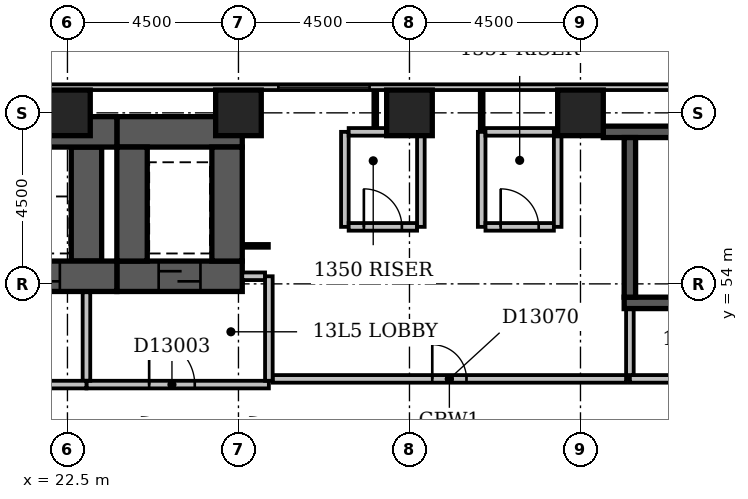
"""IFC4 building model, lengths in metres.
Left out: names, types, materials, properties, quantities, classifications, styles, units other than length and angle.
Written with IfcOpenShell. Run it as: python <this file> out.ifc"""

import sys

from ifc_helpers import new_model, si_unit, direction, frame, frame_2d, origin, origin_2d, place, context, subcontext, project, spatial, rectangle, extrude, element, fill, save


model = new_model("IFC4")
c1 = context("Model", 3, precision=1e-05, world=origin(), true_north=direction((0.0, 1.0)))
c2 = subcontext(c1, "Body", "Model", "MODEL_VIEW")
j1 = project(units=[si_unit("LENGTHUNIT", "METRE"), si_unit("PLANEANGLEUNIT", "RADIAN")], contexts=[c1])
p1 = place(None, origin())
s1 = spatial("IfcSite", under=j1, at=p1, CompositionType="ELEMENT")
p2 = place(p1, origin())
s2 = spatial("IfcBuilding", under=s1, at=p2, CompositionType="ELEMENT")
p3 = place(p2, frame((0.0, 0.0, 57.8)))
s3 = spatial("IfcBuildingStorey", under=s2, at=p3, CompositionType="ELEMENT", Elevation=57.8)
p4 = place(p3, frame((7.35, 54.2, -0.3), z_axis=(0.0, 0.0, 1.0), x_axis=(1.0, 0.0, 0.0)))
e1 = element("IfcWall", 1, at=p4, inside=s3, PredefinedType="SHEAR", context=c2, shape_type="SweptSolid", body=[
    extrude(rectangle(XDim=16.45, YDim=0.8, at=frame_2d((8.225, 0.0))), origin(), (0.0, 0.0, 1.0), 3.6),
])
p5 = place(p4, frame((1.35, 0.0, 0.3)))
e2 = element("IfcOpeningElement", 2, at=p5, cuts=e1, PredefinedType="OPENING", context=c2, shape_type="SweptSolid", body=[
    extrude(rectangle(XDim=1.1, YDim=2.1, at=frame_2d((0.55, 1.05))), frame((0.0, 0.412, 0.0), z_axis=(0.0, -1.0, 0.0), x_axis=(1.0, 0.0, 0.0)), (0.0, 0.0, 1.0), 0.824),
])
p6 = place(p4, frame((3.85, 0.0, 0.3)))
e3 = element("IfcOpeningElement", 3, at=p6, cuts=e1, PredefinedType="OPENING", context=c2, shape_type="SweptSolid", body=[
    extrude(rectangle(XDim=1.1, YDim=2.1, at=frame_2d((0.55, 1.05))), frame((0.0, 0.412, 0.0), z_axis=(0.0, -1.0, 0.0), x_axis=(1.0, 0.0, 0.0)), (0.0, 0.0, 1.0), 0.824),
])
p7 = place(p4, frame((6.35, 0.0, 0.3)))
e4 = element("IfcOpeningElement", 4, at=p7, cuts=e1, PredefinedType="OPENING", context=c2, shape_type="SweptSolid", body=[
    extrude(rectangle(XDim=1.1, YDim=2.1, at=frame_2d((0.55, 1.05))), frame((0.0, 0.412, 0.0), z_axis=(0.0, -1.0, 0.0), x_axis=(1.0, 0.0, 0.0)), (0.0, 0.0, 1.0), 0.824),
])
p8 = place(p4, frame((8.85, 0.0, 0.3)))
e5 = element("IfcOpeningElement", 5, at=p8, cuts=e1, PredefinedType="OPENING", context=c2, shape_type="SweptSolid", body=[
    extrude(rectangle(XDim=1.1, YDim=2.1, at=frame_2d((0.55, 1.05))), frame((0.0, 0.412, 0.0), z_axis=(0.0, -1.0, 0.0), x_axis=(1.0, 0.0, 0.0)), (0.0, 0.0, 1.0), 0.824),
])
p9 = place(p4, frame((11.35, 0.0, 0.3)))
e6 = element("IfcOpeningElement", 6, at=p9, cuts=e1, PredefinedType="OPENING", context=c2, shape_type="SweptSolid", body=[
    extrude(rectangle(XDim=1.1, YDim=2.1, at=frame_2d((0.55, 1.05))), frame((0.0, 0.412, 0.0), z_axis=(0.0, -1.0, 0.0), x_axis=(1.0, 0.0, 0.0)), (0.0, 0.0, 1.0), 0.824),
])
p10 = place(p4, frame((13.85, 0.0, 0.3)))
e7 = element("IfcOpeningElement", 7, at=p10, cuts=e1, PredefinedType="OPENING", context=c2, shape_type="SweptSolid", body=[
    extrude(rectangle(XDim=1.1, YDim=2.1, at=frame_2d((0.55, 1.05))), frame((0.0, 0.412, 0.0), z_axis=(0.0, -1.0, 0.0), x_axis=(1.0, 0.0, 0.0)), (0.0, 0.0, 1.0), 0.824),
])
p11 = place(p3, frame((7.35, 58.0, -0.3), z_axis=(0.0, 0.0, 1.0), x_axis=(1.0, 0.0, 0.0)))
e8 = element("IfcWall", 8, at=p11, inside=s3, PredefinedType="SHEAR", context=c2, shape_type="SweptSolid", body=[
    extrude(rectangle(XDim=16.45, YDim=0.8, at=frame_2d((8.225, 0.0))), origin(), (0.0, 0.0, 1.0), 3.6),
])
p12 = place(p3, frame((23.0, 54.6, -0.3), z_axis=(0.0, 0.0, 1.0), x_axis=(0.0, 1.0, 0.0)))
e9 = element("IfcWall", 9, at=p12, inside=s3, PredefinedType="SHEAR", context=c2, shape_type="SweptSolid", body=[
    extrude(rectangle(XDim=3.0, YDim=0.8, at=frame_2d((1.5, 0.0))), origin(), (0.0, 0.0, 1.0), 3.6),
])
p13 = place(p3, frame((23.8, 54.2, -0.3), z_axis=(0.0, 0.0, 1.0), x_axis=(1.0, 0.0, 0.0)))
e10 = element("IfcWall", 10, at=p13, inside=s3, PredefinedType="SHEAR", context=c2, shape_type="SweptSolid", body=[
    extrude(rectangle(XDim=3.3, YDim=0.8, at=frame_2d((1.65, 0.0))), origin(), (0.0, 0.0, 1.0), 3.6),
])
p14 = place(p13, frame((1.1, 0.0, 0.3)))
e11 = element("IfcOpeningElement", 11, at=p14, cuts=e10, PredefinedType="OPENING", context=c2, shape_type="SweptSolid", body=[
    extrude(rectangle(XDim=1.1, YDim=2.1, at=frame_2d((0.55, 1.05))), frame((0.0, 0.412, 0.0), z_axis=(0.0, -1.0, 0.0), x_axis=(1.0, 0.0, 0.0)), (0.0, 0.0, 1.0), 0.824),
])
p15 = place(p3, frame((23.8, 58.0, -0.3), z_axis=(0.0, 0.0, 1.0), x_axis=(1.0, 0.0, 0.0)))
e12 = element("IfcWall", 12, at=p15, inside=s3, PredefinedType="SHEAR", context=c2, shape_type="SweptSolid", body=[
    extrude(rectangle(XDim=3.3, YDim=0.8, at=frame_2d((1.65, 0.0))), origin(), (0.0, 0.0, 1.0), 3.6),
])
for number, where, z_axis, x_axis in (
    (13, (24.2, 54.6, -0.3), (0.0, 0.0, 1.0), (0.0, 1.0, 0.0)),
    (14, (26.7, 54.6, -0.3), (0.0, 0.0, 1.0), (0.0, 1.0, 0.0)),
):
    element("IfcWall", number, at=place(p3, frame(where, z_axis=z_axis, x_axis=x_axis)), inside=s3, PredefinedType="SHEAR", context=c2, shape_type="SweptSolid", body=[
        extrude(rectangle(XDim=3.0, YDim=0.8, at=frame_2d((1.5, 0.0))), origin(), (0.0, 0.0, 1.0), 3.6),
    ])
p16 = place(p3, frame((36.6, 58.0, -0.3), z_axis=(0.0, 0.0, 1.0), x_axis=(1.0, 0.0, 0.0)))
e15 = element("IfcWall", 15, at=p16, inside=s3, PredefinedType="SHEAR", context=c2, shape_type="SweptSolid", body=[
    extrude(rectangle(XDim=7.8, YDim=0.3, at=frame_2d((3.9, 0.0))), origin(), (0.0, 0.0, 1.0), 3.6),
])
p17 = place(p3, frame((37.15, 53.5, -0.3), z_axis=(0.0, 0.0, 1.0), x_axis=(1.0, 0.0, 0.0)))
e16 = element("IfcWall", 16, at=p17, inside=s3, PredefinedType="SHEAR", context=c2, shape_type="SweptSolid", body=[
    extrude(rectangle(XDim=7.0, YDim=0.3, at=frame_2d((3.5, 0.0))), origin(), (0.0, 0.0, 1.0), 3.6),
])
p18 = place(p17, frame((5.58, 0.0, 0.3)))
e17 = element("IfcOpeningElement", 17, at=p18, cuts=e16, PredefinedType="OPENING", context=c2, shape_type="SweptSolid", body=[
    extrude(rectangle(XDim=1.1, YDim=2.1, at=frame_2d((0.55, 1.05))), frame((0.0, 0.162, 0.0), z_axis=(0.0, -1.0, 0.0), x_axis=(1.0, 0.0, 0.0)), (0.0, 0.0, 1.0), 0.324),
])
p19 = place(p3, frame((37.3, 53.65, -0.3), z_axis=(0.0, 0.0, 1.0), x_axis=(0.0, 1.0, 0.0)))
e18 = element("IfcWall", 18, at=p19, inside=s3, PredefinedType="SHEAR", context=c2, shape_type="SweptSolid", body=[
    extrude(rectangle(XDim=4.2, YDim=0.3, at=frame_2d((2.1, 0.0))), origin(), (0.0, 0.0, 1.0), 3.6),
])
for number, where, z_axis, x_axis in (
    (19, (22.5, 58.5, -0.3), (0.0, 0.0, 1.0), (1.0, 0.0, 0.0)),
    (20, (27.0, 58.5, -0.3), (0.0, 0.0, 1.0), (1.0, 0.0, 0.0)),
    (21, (31.5, 58.5, -0.3), (0.0, 0.0, 1.0), (1.0, 0.0, 0.0)),
    (22, (36.0, 58.5, -0.3), (0.0, 0.0, 1.0), (1.0, 0.0, 0.0)),
):
    element("IfcColumn", number, at=place(p3, frame(where, z_axis=z_axis, x_axis=x_axis)), inside=s3, PredefinedType="COLUMN", context=c2, shape_type="SweptSolid", body=[
        extrude(rectangle(XDim=1.2, YDim=1.2, at=origin_2d()), origin(), (0.0, 0.0, 1.0), 3.6),
    ])
p20 = place(p3, frame((68.1, 59.175, 0.0), z_axis=(0.0, 0.0, 1.0), x_axis=(-1.0, 0.0, 0.0)))
e23 = element("IfcWall", 23, at=p20, inside=s3, PredefinedType="STANDARD", context=c2, shape_type="SweptSolid", body=[
    extrude(rectangle(XDim=68.85, YDim=0.15, at=frame_2d((34.425, 0.0))), origin(), (0.0, 0.0, 1.0), 2.7),
])
p21 = place(p20, frame((37.65, 0.0, 0.6)))
e24 = element("IfcOpeningElement", 24, at=p21, cuts=e23, PredefinedType="OPENING", context=c2, shape_type="SweptSolid", body=[
    extrude(rectangle(XDim=2.4, YDim=1.8, at=frame_2d((1.2, 0.9))), frame((0.0, 0.087, 0.0), z_axis=(0.0, -1.0, 0.0), x_axis=(1.0, 0.0, 0.0)), (0.0, 0.0, 1.0), 0.174),
])
p22 = place(p3, frame((8.0, 51.35, 0.0), z_axis=(0.0, 0.0, 1.0), x_axis=(1.0, 0.0, 0.0)))
e25 = element("IfcWall", 25, at=p22, inside=s3, PredefinedType="PARTITIONING", context=c2, shape_type="SweptSolid", body=[
    extrude(rectangle(XDim=15.0, YDim=0.2, at=frame_2d((7.5, 0.0))), origin(), (0.0, 0.0, 1.0), 3.3),
])
p23 = place(p22, frame((3.4, 0.0, 0.0)))
e26 = element("IfcOpeningElement", 26, at=p23, cuts=e25, PredefinedType="OPENING", context=c2, shape_type="SweptSolid", body=[
    extrude(rectangle(XDim=1.2, YDim=2.1, at=frame_2d((0.6, 1.05))), frame((0.0, 0.112, 0.0), z_axis=(0.0, -1.0, 0.0), x_axis=(1.0, 0.0, 0.0)), (0.0, 0.0, 1.0), 0.224),
])
p24 = place(p22, frame((9.4, 0.0, 0.0)))
e27 = element("IfcOpeningElement", 27, at=p24, cuts=e25, PredefinedType="OPENING", context=c2, shape_type="SweptSolid", body=[
    extrude(rectangle(XDim=1.2, YDim=2.1, at=frame_2d((0.6, 1.05))), frame((0.0, 0.112, 0.0), z_axis=(0.0, -1.0, 0.0), x_axis=(1.0, 0.0, 0.0)), (0.0, 0.0, 1.0), 0.224),
])
p25 = place(p3, frame((23.0, 51.45, 0.0), z_axis=(0.0, 0.0, 1.0), x_axis=(0.0, 1.0, 0.0)))
e28 = element("IfcWall", 28, at=p25, inside=s3, PredefinedType="PARTITIONING", context=c2, shape_type="SweptSolid", body=[
    extrude(rectangle(XDim=2.33, YDim=0.2, at=frame_2d((1.165, 0.0))), origin(), (0.0, 0.0, 1.0), 3.3),
])
p26 = place(p3, frame((23.0, 51.35, 0.0), z_axis=(0.0, 0.0, 1.0), x_axis=(1.0, 0.0, 0.0)))
e29 = element("IfcWall", 29, at=p26, inside=s3, PredefinedType="PARTITIONING", context=c2, shape_type="SweptSolid", body=[
    extrude(rectangle(XDim=4.8, YDim=0.2, at=frame_2d((2.4, 0.0))), origin(), (0.0, 0.0, 1.0), 3.3),
])
p27 = place(p26, frame((1.65, 0.0, 0.0)))
e30 = element("IfcOpeningElement", 30, at=p27, cuts=e29, PredefinedType="OPENING", context=c2, shape_type="SweptSolid", body=[
    extrude(rectangle(XDim=1.2, YDim=2.1, at=frame_2d((0.6, 1.05))), frame((0.0, 0.112, 0.0), z_axis=(0.0, -1.0, 0.0), x_axis=(1.0, 0.0, 0.0)), (0.0, 0.0, 1.0), 0.224),
])
p28 = place(p3, frame((27.8, 51.45, 0.0), z_axis=(0.0, 0.0, 1.0), x_axis=(0.0, 1.0, 0.0)))
e31 = element("IfcWall", 31, at=p28, inside=s3, PredefinedType="PARTITIONING", context=c2, shape_type="SweptSolid", body=[
    extrude(rectangle(XDim=2.75, YDim=0.2, at=frame_2d((1.375, 0.0))), origin(), (0.0, 0.0, 1.0), 3.3),
])
p29 = place(p3, frame((27.1, 54.2, 0.0), z_axis=(0.0, 0.0, 1.0), x_axis=(1.0, 0.0, 0.0)))
e32 = element("IfcWall", 32, at=p29, inside=s3, PredefinedType="PARTITIONING", context=c2, shape_type="SweptSolid", body=[
    extrude(rectangle(XDim=0.6, YDim=0.2, at=frame_2d((0.3, 0.0))), origin(), (0.0, 0.0, 1.0), 3.3),
])
p30 = place(p3, frame((37.3, 51.5, 0.0), z_axis=(0.0, 0.0, 1.0), x_axis=(1.0, 0.0, 0.0)))
e33 = element("IfcWall", 33, at=p30, inside=s3, PredefinedType="PARTITIONING", context=c2, shape_type="SweptSolid", body=[
    extrude(rectangle(XDim=6.7, YDim=0.2, at=frame_2d((3.35, 0.0))), origin(), (0.0, 0.0, 1.0), 3.3),
])
p31 = place(p30, frame((2.75, 0.0, 0.0)))
e34 = element("IfcOpeningElement", 34, at=p31, cuts=e33, PredefinedType="OPENING", context=c2, shape_type="SweptSolid", body=[
    extrude(rectangle(XDim=1.2, YDim=2.1, at=frame_2d((0.6, 1.05))), frame((0.0, 0.112, 0.0), z_axis=(0.0, -1.0, 0.0), x_axis=(1.0, 0.0, 0.0)), (0.0, 0.0, 1.0), 0.224),
])
p32 = place(p3, frame((37.3, 51.6, 0.0), z_axis=(0.0, 0.0, 1.0), x_axis=(0.0, 1.0, 0.0)))
e35 = element("IfcWall", 35, at=p32, inside=s3, PredefinedType="PARTITIONING", context=c2, shape_type="SweptSolid", body=[
    extrude(rectangle(XDim=1.73, YDim=0.2, at=frame_2d((0.865, 0.0))), origin(), (0.0, 0.0, 1.0), 3.3),
])
p33 = place(p3, frame((27.9, 51.5, 0.0), z_axis=(0.0, 0.0, 1.0), x_axis=(1.0, 0.0, 0.0)))
e36 = element("IfcWall", 36, at=p33, inside=s3, PredefinedType="PARTITIONING", context=c2, shape_type="SweptSolid", body=[
    extrude(rectangle(XDim=9.3, YDim=0.2, at=frame_2d((4.65, 0.0))), origin(), (0.0, 0.0, 1.0), 3.3),
])
p34 = place(p33, frame((4.2, 0.0, 0.0)))
e37 = element("IfcOpeningElement", 37, at=p34, cuts=e36, PredefinedType="OPENING", context=c2, shape_type="SweptSolid", body=[
    extrude(rectangle(XDim=0.9, YDim=2.1, at=frame_2d((0.45, 1.05))), frame((0.0, 0.112, 0.0), z_axis=(0.0, -1.0, 0.0), x_axis=(1.0, 0.0, 0.0)), (0.0, 0.0, 1.0), 0.224),
])
p35 = place(p3, frame((27.1, 55.0, 0.0), z_axis=(0.0, 0.0, 1.0), x_axis=(1.0, 0.0, 0.0)))
e38 = element("IfcWall", 38, at=p35, inside=s3, PredefinedType="PARTITIONING", context=c2, shape_type="SweptSolid", body=[
    extrude(rectangle(XDim=0.7, YDim=0.1, at=frame_2d((0.35, 0.0))), origin(), (0.0, 0.0, 1.0), 3.3),
])
p36 = place(p3, frame((29.8, 55.5, 0.0), z_axis=(0.0, 0.0, 1.0), x_axis=(0.0, 1.0, 0.0)))
e39 = element("IfcWall", 39, at=p36, inside=s3, PredefinedType="PARTITIONING", context=c2, shape_type="SweptSolid", body=[
    extrude(rectangle(XDim=2.5, YDim=0.2, at=frame_2d((1.25, 0.0))), origin(), (0.0, 0.0, 1.0), 3.3),
])
p37 = place(p3, frame((29.9, 55.5, 0.0), z_axis=(0.0, 0.0, 1.0), x_axis=(1.0, 0.0, 0.0)))
e40 = element("IfcWall", 40, at=p37, inside=s3, PredefinedType="PARTITIONING", context=c2, shape_type="SweptSolid", body=[
    extrude(rectangle(XDim=1.8, YDim=0.2, at=frame_2d((0.9, 0.0))), origin(), (0.0, 0.0, 1.0), 3.3),
])
p38 = place(p37, frame((0.4, 0.0, 0.0)))
e41 = element("IfcOpeningElement", 41, at=p38, cuts=e40, PredefinedType="OPENING", context=c2, shape_type="SweptSolid", body=[
    extrude(rectangle(XDim=1.0, YDim=2.1, at=frame_2d((0.5, 1.05))), frame((0.0, 0.112, 0.0), z_axis=(0.0, -1.0, 0.0), x_axis=(1.0, 0.0, 0.0)), (0.0, 0.0, 1.0), 0.224),
])
for number, where, z_axis, x_axis in (
    (42, (31.8, 55.5, 0.0), (0.0, 0.0, 1.0), (0.0, 1.0, 0.0)),
    (43, (33.4, 55.5, 0.0), (0.0, 0.0, 1.0), (0.0, 1.0, 0.0)),
):
    element("IfcWall", number, at=place(p3, frame(where, z_axis=z_axis, x_axis=x_axis)), inside=s3, PredefinedType="PARTITIONING", context=c2, shape_type="SweptSolid", body=[
        extrude(rectangle(XDim=2.5, YDim=0.2, at=frame_2d((1.25, 0.0))), origin(), (0.0, 0.0, 1.0), 3.3),
    ])
p39 = place(p3, frame((33.5, 55.5, 0.0), z_axis=(0.0, 0.0, 1.0), x_axis=(1.0, 0.0, 0.0)))
e44 = element("IfcWall", 44, at=p39, inside=s3, PredefinedType="PARTITIONING", context=c2, shape_type="SweptSolid", body=[
    extrude(rectangle(XDim=1.8, YDim=0.2, at=frame_2d((0.9, 0.0))), origin(), (0.0, 0.0, 1.0), 3.3),
])
p40 = place(p39, frame((0.4, 0.0, 0.0)))
e45 = element("IfcOpeningElement", 45, at=p40, cuts=e44, PredefinedType="OPENING", context=c2, shape_type="SweptSolid", body=[
    extrude(rectangle(XDim=1.0, YDim=2.1, at=frame_2d((0.5, 1.05))), frame((0.0, 0.112, 0.0), z_axis=(0.0, -1.0, 0.0), x_axis=(1.0, 0.0, 0.0)), (0.0, 0.0, 1.0), 0.224),
])
p41 = place(p3, frame((35.4, 55.5, 0.0), z_axis=(0.0, 0.0, 1.0), x_axis=(0.0, 1.0, 0.0)))
e46 = element("IfcWall", 46, at=p41, inside=s3, PredefinedType="PARTITIONING", context=c2, shape_type="SweptSolid", body=[
    extrude(rectangle(XDim=2.5, YDim=0.2, at=frame_2d((1.25, 0.0))), origin(), (0.0, 0.0, 1.0), 2.4),
])
p42 = place(p3, frame((29.9, 58.0, 0.0), z_axis=(0.0, 0.0, 1.0), x_axis=(1.0, 0.0, 0.0)))
e47 = element("IfcWall", 47, at=p42, inside=s3, PredefinedType="PARTITIONING", context=c2, shape_type="SweptSolid", body=[
    extrude(rectangle(XDim=1.8, YDim=0.2, at=frame_2d((0.9, 0.0))), origin(), (0.0, 0.0, 1.0), 3.3),
])
p43 = place(p3, frame((33.4, 58.0, 0.0), z_axis=(0.0, 0.0, 1.0), x_axis=(0.0, 1.0, 0.0)))
e48 = element("IfcWall", 48, at=p43, inside=s3, PredefinedType="PARTITIONING", context=c2, shape_type="SweptSolid", body=[
    extrude(rectangle(XDim=1.1, YDim=0.1, at=frame_2d((0.55, 0.0))), origin(), (0.0, 0.0, 1.0), 3.3),
])
p44 = place(p3, frame((33.5, 58.0, 0.0), z_axis=(0.0, 0.0, 1.0), x_axis=(1.0, 0.0, 0.0)))
e49 = element("IfcWall", 49, at=p44, inside=s3, PredefinedType="PARTITIONING", context=c2, shape_type="SweptSolid", body=[
    extrude(rectangle(XDim=1.8, YDim=0.2, at=frame_2d((0.9, 0.0))), origin(), (0.0, 0.0, 1.0), 3.3),
])
p45 = place(p3, frame((30.6, 58.1, 0.0), z_axis=(0.0, 0.0, 1.0), x_axis=(0.0, 1.0, 0.0)))
e50 = element("IfcWall", 50, at=p45, inside=s3, PredefinedType="PARTITIONING", context=c2, shape_type="SweptSolid", body=[
    extrude(rectangle(XDim=1.0, YDim=0.1, at=frame_2d((0.5, 0.0))), origin(), (0.0, 0.0, 1.0), 3.3),
])
p46 = place(p21, origin())
e51 = element("IfcWindow", 51, at=p46, inside=s3, PartitioningType="SINGLE_PANEL", PredefinedType="WINDOW", context=c2, shape_type="SweptSolid", body=[
    extrude(rectangle(XDim=2.4, YDim=1.8, at=frame_2d((1.2, 0.9))), frame((0.0, 0.03, 0.0), z_axis=(0.0, -1.0, 0.0), x_axis=(1.0, 0.0, 0.0)), (0.0, 0.0, 1.0), 0.06),
])
fill(e24, e51)
p47 = place(p27, origin())
e52 = element("IfcDoor", 52, at=p47, inside=s3, OperationType="SINGLE_SWING_LEFT", PredefinedType="DOOR", context=c2, shape_type="SweptSolid", body=[
    extrude(rectangle(XDim=1.2, YDim=2.1, at=frame_2d((0.6, 1.05))), frame((0.0, 0.025, 0.0), z_axis=(0.0, -1.0, 0.0), x_axis=(1.0, 0.0, 0.0)), (0.0, 0.0, 1.0), 0.05),
])
fill(e30, e52)
p48 = place(p14, origin())
e53 = element("IfcDoor", 53, at=p48, inside=s3, OperationType="SLIDING_TO_LEFT", PredefinedType="DOOR", context=c2, shape_type="SweptSolid", body=[
    extrude(rectangle(XDim=1.1, YDim=2.1, at=frame_2d((0.55, 1.05))), frame((0.0, 0.025, 0.0), z_axis=(0.0, -1.0, 0.0), x_axis=(1.0, 0.0, 0.0)), (0.0, 0.0, 1.0), 0.05),
])
fill(e11, e53)
p49 = place(p10, origin())
e54 = element("IfcDoor", 54, at=p49, inside=s3, OperationType="SLIDING_TO_LEFT", PredefinedType="DOOR", context=c2, shape_type="SweptSolid", body=[
    extrude(rectangle(XDim=1.1, YDim=2.1, at=frame_2d((0.55, 1.05))), frame((0.0, 0.025, 0.0), z_axis=(0.0, -1.0, 0.0), x_axis=(1.0, 0.0, 0.0)), (0.0, 0.0, 1.0), 0.05),
])
fill(e7, e54)
p50 = place(p34, origin())
e55 = element("IfcDoor", 55, at=p50, inside=s3, OperationType="SINGLE_SWING_LEFT", PredefinedType="DOOR", context=c2, shape_type="SweptSolid", body=[
    extrude(rectangle(XDim=0.9, YDim=2.1, at=frame_2d((0.45, 1.05))), frame((0.0, 0.025, 0.0), z_axis=(0.0, -1.0, 0.0), x_axis=(1.0, 0.0, 0.0)), (0.0, 0.0, 1.0), 0.05),
])
fill(e37, e55)
p51 = place(p38, origin())
e56 = element("IfcDoor", 56, at=p51, inside=s3, OperationType="SINGLE_SWING_LEFT", PredefinedType="DOOR", context=c2, shape_type="SweptSolid", body=[
    extrude(rectangle(XDim=1.0, YDim=2.1, at=frame_2d((0.5, 1.05))), frame((0.0, 0.025, 0.0), z_axis=(0.0, -1.0, 0.0), x_axis=(1.0, 0.0, 0.0)), (0.0, 0.0, 1.0), 0.05),
])
fill(e41, e56)
p52 = place(p40, origin())
e57 = element("IfcDoor", 57, at=p52, inside=s3, OperationType="SINGLE_SWING_LEFT", PredefinedType="DOOR", context=c2, shape_type="SweptSolid", body=[
    extrude(rectangle(XDim=1.0, YDim=2.1, at=frame_2d((0.5, 1.05))), frame((0.0, 0.025, 0.0), z_axis=(0.0, -1.0, 0.0), x_axis=(1.0, 0.0, 0.0)), (0.0, 0.0, 1.0), 0.05),
])
fill(e45, e57)
save(model, sys.argv[1])
